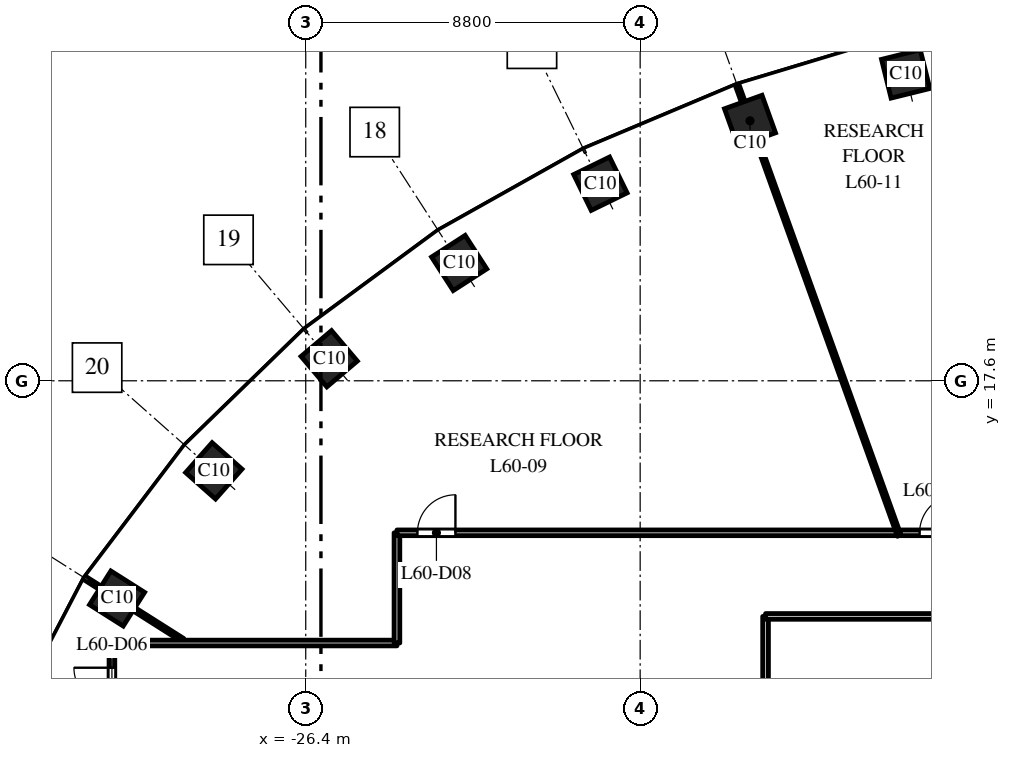
"""IFC4 building model, lengths in metres.
Left out: names, types, materials, properties, quantities, classifications, styles, units other than length and angle.
Written with IfcOpenShell. Run it as: python <this file> out.ifc"""

import sys

from ifc_helpers import new_model, si_unit, direction, frame, frame_2d, origin, origin_2d, place, context, subcontext, project, spatial, rectangle, extrude, element, fill, save


model = new_model("IFC4")
c1 = context("Model", 3, precision=1e-05, world=origin(), true_north=direction((0.0, 1.0)))
c2 = subcontext(c1, "Body", "Model", "MODEL_VIEW")
j1 = project(units=[si_unit("LENGTHUNIT", "METRE"), si_unit("PLANEANGLEUNIT", "RADIAN")], contexts=[c1])
p1 = place(None, origin())
s1 = spatial("IfcSite", under=j1, at=p1, CompositionType="ELEMENT")
p2 = place(p1, origin())
s2 = spatial("IfcBuilding", under=s1, at=p2, CompositionType="ELEMENT")
p3 = place(p2, frame((0.0, 0.0, 281.5)))
s3 = spatial("IfcBuildingStorey", under=s2, at=p3, CompositionType="ELEMENT", Elevation=281.5)
for number, where, z_axis, x_axis in (
    (1, (-10.613, 25.674, 0.0), (0.0, 0.0, 1.0), (-0.971, -0.24, 0.0)),
    (2, (-14.709, 24.441, 0.0), (0.0, 0.0, 1.0), (-0.941, -0.338, 0.0)),
    (3, (-18.646, 22.785, 0.0), (0.0, 0.0, 1.0), (-0.898, -0.439, 0.0)),
    (4, (-22.362, 20.7, 0.0), (0.0, 0.0, 1.0), (-0.84, -0.542, 0.0)),
    (5, (-25.783, 18.18, 0.0), (0.0, 0.0, 1.0), (-0.763, -0.646, 0.0)),
    (6, (-28.819, 15.23, 0.0), (0.0, 0.0, 1.0), (-0.663, -0.749, 0.0)),
    (7, (-31.365, 11.871, 0.0), (0.0, 0.0, 1.0), (-0.535, -0.845, 0.0)),
):
    element("IfcColumn", number, at=place(p3, frame(where, z_axis=z_axis, x_axis=x_axis)), inside=s3, PredefinedType="COLUMN", context=c2, shape_type="SweptSolid", body=[
        extrude(rectangle(XDim=1.05, YDim=1.05, at=origin_2d()), origin(), (0.0, 0.0, 1.0), 4.0),
    ])
p4 = place(p3, frame((-32.212, 12.408, 0.0), z_axis=(0.0, 0.0, 1.0), x_axis=(0.844810627195, -0.535065420467, 0.0)))
e8 = element("IfcWall", 8, at=p4, inside=s3, PredefinedType="PARTITIONING", context=c2, shape_type="SweptSolid", body=[
    extrude(rectangle(XDim=3.048, YDim=0.1, at=frame_2d((1.524, 0.0))), origin(), (0.0, 0.0, 1.0), 3.7),
])
p5 = place(p3, frame((-31.5, 8.5, 0.0), z_axis=(0.0, 0.0, 1.0), x_axis=(0.0, 1.0, 0.0)))
e9 = element("IfcWall", 9, at=p5, inside=s3, PredefinedType="PARTITIONING", context=c2, shape_type="SweptSolid", body=[
    extrude(rectangle(XDim=2.2, YDim=0.15, at=frame_2d((1.1, 0.0))), origin(), (0.0, 0.0, 1.0), 3.7),
])
p6 = place(p5, frame((0.55, 0.0, 0.0)))
e10 = element("IfcOpeningElement", 10, at=p6, cuts=e9, PredefinedType="OPENING", context=c2, shape_type="SweptSolid", body=[
    extrude(rectangle(XDim=1.0, YDim=2.1, at=frame_2d((0.5, 1.05))), frame((0.0, 0.085, 0.0), z_axis=(0.0, -1.0, 0.0), x_axis=(1.0, 0.0, 0.0)), (0.0, 0.0, 1.0), 0.17),
])
p7 = place(p3, frame((-31.5, 10.7, 0.0), z_axis=(0.0, 0.0, 1.0), x_axis=(1.0, 0.0, 0.0)))
e11 = element("IfcWall", 11, at=p7, inside=s3, PredefinedType="PARTITIONING", context=c2, shape_type="SweptSolid", body=[
    extrude(rectangle(XDim=7.5, YDim=0.15, at=frame_2d((3.75, 0.0))), origin(), (0.0, 0.0, 1.0), 3.1),
])
p8 = place(p3, frame((-24.0, 10.7, 0.0), z_axis=(0.0, 0.0, 1.0), x_axis=(0.0, 1.0, 0.0)))
e12 = element("IfcWall", 12, at=p8, inside=s3, PredefinedType="PARTITIONING", context=c2, shape_type="SweptSolid", body=[
    extrude(rectangle(XDim=2.9, YDim=0.15, at=frame_2d((1.45, 0.0))), origin(), (0.0, 0.0, 1.0), 3.7),
])
p9 = place(p3, frame((-24.0, 13.6, 0.0), z_axis=(0.0, 0.0, 1.0), x_axis=(1.0, 0.0, 0.0)))
e13 = element("IfcWall", 13, at=p9, inside=s3, PredefinedType="PARTITIONING", context=c2, shape_type="SweptSolid", body=[
    extrude(rectangle(XDim=13.177, YDim=0.15, at=frame_2d((6.588, 0.0))), origin(), (0.0, 0.0, 1.0), 2.75),
])
p10 = place(p9, frame((0.539, 0.0, 0.0)))
e14 = element("IfcOpeningElement", 14, at=p10, cuts=e13, PredefinedType="OPENING", context=c2, shape_type="SweptSolid", body=[
    extrude(rectangle(XDim=1.0, YDim=2.1, at=frame_2d((0.5, 1.05))), frame((0.0, 0.085, 0.0), z_axis=(0.0, -1.0, 0.0), x_axis=(1.0, 0.0, 0.0)), (0.0, 0.0, 1.0), 0.17),
])
p11 = place(p3, frame((-15.048, 25.383, 0.0), z_axis=(0.0, 0.0, 1.0), x_axis=(0.338383971485, -0.941008123154, 0.0)))
e15 = element("IfcWall", 15, at=p11, inside=s3, PredefinedType="PARTITIONING", context=c2, shape_type="SweptSolid", body=[
    extrude(rectangle(XDim=12.602, YDim=0.1, at=frame_2d((6.301, 0.0))), origin(), (0.0, 0.0, 1.0), 3.0),
])
p12 = place(p3, frame((-14.3, -11.4, 0.0), z_axis=(0.0, 0.0, 1.0), x_axis=(0.0, 1.0, 0.0)))
e16 = element("IfcWall", 16, at=p12, inside=s3, PredefinedType="PARTITIONING", context=c2, shape_type="SweptSolid", body=[
    extrude(rectangle(XDim=22.8, YDim=0.15, at=frame_2d((11.4, 0.0))), origin(), (0.0, 0.0, 1.0), 2.75),
])
p13 = place(p12, frame((0.65, 0.0, 0.0)))
e17 = element("IfcOpeningElement", 17, at=p13, cuts=e16, PredefinedType="OPENING", context=c2, shape_type="SweptSolid", body=[
    extrude(rectangle(XDim=1.0, YDim=2.1, at=frame_2d((0.5, 1.05))), frame((0.0, 0.085, 0.0), z_axis=(0.0, -1.0, 0.0), x_axis=(1.0, 0.0, 0.0)), (0.0, 0.0, 1.0), 0.17),
])
p14 = place(p3, frame((-14.3, 11.4, 0.0), z_axis=(0.0, 0.0, 1.0), x_axis=(1.0, 0.0, 0.0)))
e18 = element("IfcWall", 18, at=p14, inside=s3, PredefinedType="PARTITIONING", context=c2, shape_type="SweptSolid", body=[
    extrude(rectangle(XDim=28.6, YDim=0.15, at=frame_2d((14.3, 0.0))), origin(), (0.0, 0.0, 1.0), 2.85),
])
p15 = place(p14, frame((10.66, 0.0, 0.0)))
e19 = element("IfcOpeningElement", 19, at=p15, cuts=e18, PredefinedType="OPENING", context=c2, shape_type="SweptSolid", body=[
    extrude(rectangle(XDim=1.0, YDim=2.1, at=frame_2d((0.5, 1.05))), frame((0.0, 0.085, 0.0), z_axis=(0.0, -1.0, 0.0), x_axis=(1.0, 0.0, 0.0)), (0.0, 0.0, 1.0), 0.17),
])
p16 = place(p14, frame((15.427, 0.0, 0.0)))
e20 = element("IfcOpeningElement", 20, at=p16, cuts=e18, PredefinedType="OPENING", context=c2, shape_type="SweptSolid", body=[
    extrude(rectangle(XDim=1.0, YDim=2.1, at=frame_2d((0.5, 1.05))), frame((0.0, 0.085, 0.0), z_axis=(0.0, -1.0, 0.0), x_axis=(1.0, 0.0, 0.0)), (0.0, 0.0, 1.0), 0.17),
])
p17 = place(p14, frame((22.693, 0.0, 0.0)))
e21 = element("IfcOpeningElement", 21, at=p17, cuts=e18, PredefinedType="OPENING", context=c2, shape_type="SweptSolid", body=[
    extrude(rectangle(XDim=1.0, YDim=2.1, at=frame_2d((0.5, 1.05))), frame((0.0, 0.085, 0.0), z_axis=(0.0, -1.0, 0.0), x_axis=(1.0, 0.0, 0.0)), (0.0, 0.0, 1.0), 0.17),
])
p18 = place(p3, frame((-10.758, 13.6, 0.0), z_axis=(0.0, 0.0, 1.0), x_axis=(1.0, 0.0, 0.0)))
e22 = element("IfcWall", 22, at=p18, inside=s3, PredefinedType="PARTITIONING", context=c2, shape_type="SweptSolid", body=[
    extrude(rectangle(XDim=15.304, YDim=0.15, at=frame_2d((7.652, 0.0))), origin(), (0.0, 0.0, 1.0), 2.85),
])
p19 = place(p18, frame((0.511, 0.0, 0.0)))
e23 = element("IfcOpeningElement", 23, at=p19, cuts=e22, PredefinedType="OPENING", context=c2, shape_type="SweptSolid", body=[
    extrude(rectangle(XDim=1.0, YDim=2.1, at=frame_2d((0.5, 1.05))), frame((0.0, 0.085, 0.0), z_axis=(0.0, -1.0, 0.0), x_axis=(1.0, 0.0, 0.0)), (0.0, 0.0, 1.0), 0.17),
])
p20 = place(p18, frame((13.674, 0.0, 0.0)))
e24 = element("IfcOpeningElement", 24, at=p20, cuts=e22, PredefinedType="OPENING", context=c2, shape_type="SweptSolid", body=[
    extrude(rectangle(XDim=1.0, YDim=2.1, at=frame_2d((0.5, 1.05))), frame((0.0, 0.085, 0.0), z_axis=(0.0, -1.0, 0.0), x_axis=(1.0, 0.0, 0.0)), (0.0, 0.0, 1.0), 0.17),
])
p21 = place(p6, origin())
e25 = element("IfcDoor", 25, at=p21, inside=s3, OperationType="SINGLE_SWING_RIGHT", PredefinedType="DOOR", context=c2, shape_type="SweptSolid", body=[
    extrude(rectangle(XDim=1.0, YDim=2.1, at=frame_2d((0.5, 1.05))), frame((0.0, 0.025, 0.0), z_axis=(0.0, -1.0, 0.0), x_axis=(1.0, 0.0, 0.0)), (0.0, 0.0, 1.0), 0.05),
])
fill(e10, e25)
p22 = place(p10, origin())
e26 = element("IfcDoor", 26, at=p22, inside=s3, OperationType="SINGLE_SWING_RIGHT", PredefinedType="DOOR", context=c2, shape_type="SweptSolid", body=[
    extrude(rectangle(XDim=1.0, YDim=2.1, at=frame_2d((0.5, 1.05))), frame((0.0, 0.025, 0.0), z_axis=(0.0, -1.0, 0.0), x_axis=(1.0, 0.0, 0.0)), (0.0, 0.0, 1.0), 0.05),
])
fill(e14, e26)
p23 = place(p19, origin())
e27 = element("IfcDoor", 27, at=p23, inside=s3, OperationType="SINGLE_SWING_RIGHT", PredefinedType="DOOR", context=c2, shape_type="SweptSolid", body=[
    extrude(rectangle(XDim=1.0, YDim=2.1, at=frame_2d((0.5, 1.05))), frame((0.0, 0.025, 0.0), z_axis=(0.0, -1.0, 0.0), x_axis=(1.0, 0.0, 0.0)), (0.0, 0.0, 1.0), 0.05),
])
fill(e23, e27)
save(model, sys.argv[1])
